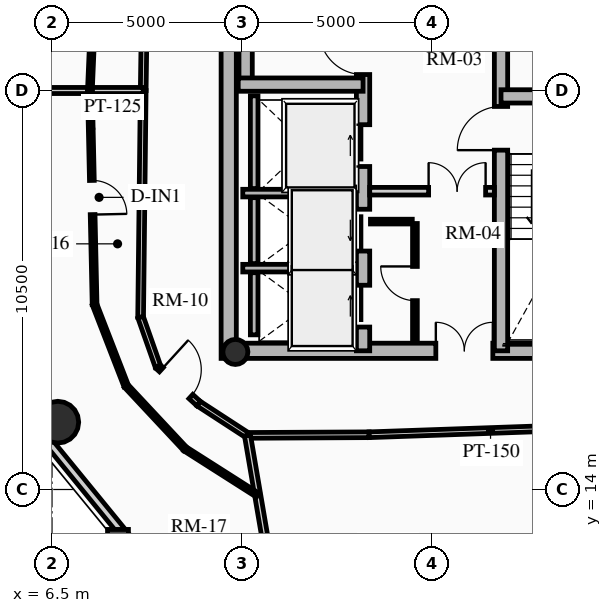
"""IFC4 building model, lengths in metres.
Left out: names, types, materials, properties, quantities, classifications, styles, units other than length and angle.
Written with IfcOpenShell. Run it as: python <this file> out.ifc"""

import sys

from ifc_helpers import new_model, si_unit, direction, frame, frame_2d, origin, origin_2d, place, context, subcontext, project, spatial, rectangle, circle, hollow_circle, extrude, source, transform, mapped, element, fill, save


model = new_model("IFC4")
c1 = context("Model", 3, precision=1e-05, world=origin(), true_north=direction((0.0, 1.0)))
c2 = subcontext(c1, "Body", "Model", "MODEL_VIEW")
j1 = project(units=[si_unit("LENGTHUNIT", "METRE"), si_unit("PLANEANGLEUNIT", "RADIAN")], contexts=[c1])
p1 = place(None, origin())
s1 = spatial("IfcSite", under=j1, at=p1, CompositionType="ELEMENT")
p2 = place(p1, origin())
s2 = spatial("IfcBuilding", under=s1, at=p2, CompositionType="ELEMENT")
p3 = place(p2, frame((0.0, 0.0, 222.85)))
s3 = spatial("IfcBuildingStorey", under=s2, at=p3, CompositionType="ELEMENT", Elevation=222.85)
p4 = place(p3, frame((11.15, 17.45, 0.0), z_axis=(0.0, 0.0, 1.0), x_axis=(0.0, 1.0, 0.0)))
e1 = element("IfcWall", 1, at=p4, inside=s3, PredefinedType="SHEAR", context=c2, shape_type="SweptSolid", body=[
    extrude(rectangle(XDim=14.1, YDim=0.4, at=frame_2d((7.05, 0.0))), origin(), (0.0, 0.0, 1.0), 3.2),
])
p5 = place(p3, frame((11.15, 17.65, 0.0), z_axis=(0.0, 0.0, 1.0), x_axis=(1.0, 0.0, 0.0)))
e2 = element("IfcWall", 2, at=p5, inside=s3, PredefinedType="SHEAR", context=c2, shape_type="SweptSolid", body=[
    extrude(rectangle(XDim=10.7, YDim=0.4, at=frame_2d((5.35, 0.0))), origin(), (0.0, 0.0, 1.0), 3.2),
])
m1 = source(origin(), c2, "Body", "SweptSolid", [
    extrude(rectangle(XDim=1.5, YDim=2.02, at=frame_2d((0.75, 1.01))), frame((0.0, 0.21, 0.0), z_axis=(0.0, -1.0, 0.0), x_axis=(1.0, 0.0, 0.0)), (0.0, 0.0, 1.0), 0.42),
])
p6 = place(p5, frame((5.45, 0.0, 0.0)))
e3 = element("IfcOpeningElement", 3, at=p6, cuts=e2, PredefinedType="OPENING", context=c2, shape_type="MappedRepresentation", body=[
    mapped(m1, transform((0.0, 0.0, 0.0), x_axis=(1.0, 0.0, 0.0), y_axis=(0.0, 1.0, 0.0), z_axis=(0.0, 0.0, 1.0), scale=1.0)),
])
p7 = place(p3, frame((14.685, 17.65, 0.0), z_axis=(0.0, 0.0, 1.0), x_axis=(0.0, 1.0, 0.0)))
e4 = element("IfcWall", 4, at=p7, inside=s3, PredefinedType="SHEAR", context=c2, shape_type="SweptSolid", body=[
    extrude(rectangle(XDim=13.7, YDim=0.35, at=frame_2d((6.85, 0.0))), origin(), (0.0, 0.0, 1.0), 3.2),
])
m2 = source(origin(), c2, "Body", "SweptSolid", [
    extrude(rectangle(XDim=1.1, YDim=2.015, at=frame_2d((0.55, 1.007))), frame((0.0, 0.185, 0.0), z_axis=(0.0, -1.0, 0.0), x_axis=(1.0, 0.0, 0.0)), (0.0, 0.0, 1.0), 0.37),
])
p8 = place(p7, frame((4.85, 0.0, 0.0)))
e5 = element("IfcOpeningElement", 5, at=p8, cuts=e4, PredefinedType="OPENING", context=c2, shape_type="MappedRepresentation", body=[
    mapped(m2, transform((0.0, 0.0, 0.0), x_axis=(1.0, 0.0, 0.0), y_axis=(0.0, 1.0, 0.0), z_axis=(0.0, 0.0, 1.0), scale=1.0)),
])
p9 = place(p7, frame((0.625, 0.0, 0.0)))
e6 = element("IfcOpeningElement", 6, at=p9, cuts=e4, PredefinedType="OPENING", context=c2, shape_type="MappedRepresentation", body=[
    mapped(m2, transform((0.0, 0.0, 0.0), x_axis=(1.0, 0.0, 0.0), y_axis=(0.0, 1.0, 0.0), z_axis=(0.0, 0.0, 1.0), scale=1.0)),
])
p10 = place(p7, frame((2.625, 0.0, 0.0)))
e7 = element("IfcOpeningElement", 7, at=p10, cuts=e4, PredefinedType="OPENING", context=c2, shape_type="MappedRepresentation", body=[
    mapped(m2, transform((0.0, 0.0, 0.0), x_axis=(1.0, 0.0, 0.0), y_axis=(0.0, 1.0, 0.0), z_axis=(0.0, 0.0, 1.0), scale=1.0)),
])
m3 = source(origin(), c2, "Body", "SweptSolid", [
    extrude(rectangle(XDim=1.15, YDim=2.02, at=frame_2d((0.575, 1.01))), frame((0.0, 0.185, 0.0), z_axis=(0.0, -1.0, 0.0), x_axis=(1.0, 0.0, 0.0)), (0.0, 0.0, 1.0), 0.37),
])
p11 = place(p7, frame((7.27, 0.0, 0.0)))
e8 = element("IfcOpeningElement", 8, at=p11, cuts=e4, PredefinedType="OPENING", context=c2, shape_type="MappedRepresentation", body=[
    mapped(m3, transform((0.0, 0.0, 0.0), x_axis=(1.0, 0.0, 0.0), y_axis=(0.0, 1.0, 0.0), z_axis=(0.0, 0.0, 1.0), scale=1.0)),
])
p12 = place(p3, frame((18.315, 17.65, 0.0), z_axis=(0.0, 0.0, 1.0), x_axis=(0.0, 1.0, 0.0)))
e9 = element("IfcWall", 9, at=p12, inside=s3, PredefinedType="SHEAR", context=c2, shape_type="SweptSolid", body=[
    extrude(rectangle(XDim=9.6, YDim=0.35, at=frame_2d((4.8, 0.0))), origin(), (0.0, 0.0, 1.0), 3.2),
])
p13 = place(p12, frame((5.28, 0.0, 0.0)))
e10 = element("IfcOpeningElement", 10, at=p13, cuts=e9, PredefinedType="OPENING", context=c2, shape_type="MappedRepresentation", body=[
    mapped(m3, transform((0.0, 0.0, 0.0), x_axis=(1.0, 0.0, 0.0), y_axis=(0.0, 1.0, 0.0), z_axis=(0.0, 0.0, 1.0), scale=1.0)),
])
p14 = place(p3, frame((11.595, 24.655, 0.0), z_axis=(0.0, 0.0, 1.0), x_axis=(0.0, 1.0, 0.0)))
e11 = element("IfcWall", 11, at=p14, inside=s3, PredefinedType="SHEAR", context=c2, shape_type="SweptSolid", body=[
    extrude(rectangle(XDim=6.695, YDim=0.35, at=frame_2d((3.348, 0.0))), origin(), (0.0, 0.0, 1.0), 3.2),
])
for number, where, z_axis, x_axis in (
    (12, (11.4, 24.655, 0.0), (0.0, 0.0, 1.0), (1.0, 0.0, 0.0)),
    (13, (18.315, 24.345, 0.0), (0.0, 0.0, 1.0), (1.0, 0.0, 0.0)),
):
    element("IfcWall", number, at=place(p3, frame(where, z_axis=z_axis, x_axis=x_axis)), inside=s3, PredefinedType="SHEAR", context=c2, shape_type="SweptSolid", body=[
        extrude(rectangle(XDim=3.285, YDim=0.35, at=frame_2d((1.643, 0.0))), origin(), (0.0, 0.0, 1.0), 3.2),
    ])
p15 = place(p3, frame((11.325, 17.62, 0.0), z_axis=(0.0, 0.0, 1.0), x_axis=(1.0, 0.0, 0.0)))
e14 = element("IfcColumn", 14, at=p15, inside=s3, PredefinedType="COLUMN", context=c2, shape_type="SweptSolid", body=[
    extrude(hollow_circle(Radius=0.33, WallThickness=0.025, at=origin_2d()), origin(), (0.0, 0.0, 1.0), 3.2),
])
p16 = place(p3, frame((6.653, 15.771, 0.0), z_axis=(0.0, 0.0, 1.0), x_axis=(1.0, 0.0, 0.0)))
e15 = element("IfcColumn", 15, at=p16, inside=s3, PredefinedType="USERDEFINED", context=c2, shape_type="SweptSolid", body=[
    extrude(circle(Radius=0.55, at=origin_2d()), origin(), (0.0, 0.0, 1.0), 3.2),
])
p17 = place(p3, frame((9.076, 11.985, 0.0), z_axis=(0.0, 0.0, 1.0), x_axis=(-0.632467166636, 0.774587169483, 0.0)))
e16 = element("IfcWall", 16, at=p17, inside=s3, PredefinedType="SOLIDWALL", context=c2, shape_type="SweptSolid", body=[
    extrude(rectangle(XDim=4.418, YDim=0.22, at=frame_2d((2.209, 0.0))), origin(), (0.0, 0.0, 1.0), 2.612),
])
p18 = place(p3, frame((11.52, 21.8, 0.0), z_axis=(0.0, 0.0, 1.0), x_axis=(1.0, 0.0, 0.0)))
e17 = element("IfcWall", 17, at=p18, inside=s3, PredefinedType="SHEAR", context=c2, shape_type="SweptSolid", body=[
    extrude(rectangle(XDim=2.97, YDim=0.2, at=frame_2d((1.485, 0.0))), origin(), (0.0, 0.0, 1.0), 3.2),
])
p19 = place(p3, frame((11.82, 21.92, 0.0), z_axis=(0.0, 0.0, 1.0), x_axis=(0.0, 1.0, 0.0)))
e18 = element("IfcWall", 18, at=p19, inside=s3, PredefinedType="SHEAR", context=c2, shape_type="SweptSolid", body=[
    extrude(rectangle(XDim=2.44, YDim=0.2, at=frame_2d((1.22, 0.0))), origin(), (0.0, 0.0, 1.0), 3.2),
])
p20 = place(p3, frame((11.52, 19.825, 0.0), z_axis=(0.0, 0.0, 1.0), x_axis=(1.0, 0.0, 0.0)))
e19 = element("IfcWall", 19, at=p20, inside=s3, PredefinedType="SHEAR", context=c2, shape_type="SweptSolid", body=[
    extrude(rectangle(XDim=2.97, YDim=0.2, at=frame_2d((1.485, 0.0))), origin(), (0.0, 0.0, 1.0), 3.2),
])
p21 = place(p3, frame((11.82, 19.945, 0.0), z_axis=(0.0, 0.0, 1.0), x_axis=(0.0, 1.0, 0.0)))
e20 = element("IfcWall", 20, at=p21, inside=s3, PredefinedType="SHEAR", context=c2, shape_type="SweptSolid", body=[
    extrude(rectangle(XDim=1.735, YDim=0.2, at=frame_2d((0.867, 0.0))), origin(), (0.0, 0.0, 1.0), 3.2),
])
p22 = place(p3, frame((11.82, 18.07, 0.0), z_axis=(0.0, 0.0, 1.0), x_axis=(0.0, 1.0, 0.0)))
e21 = element("IfcWall", 21, at=p22, inside=s3, PredefinedType="SHEAR", context=c2, shape_type="SweptSolid", body=[
    extrude(rectangle(XDim=1.635, YDim=0.2, at=frame_2d((0.817, 0.0))), origin(), (0.0, 0.0, 1.0), 3.2),
])
p23 = place(p3, frame((14.86, 21.85, 0.0), z_axis=(0.0, 0.0, 1.0), x_axis=(1.0, 0.0, 0.0)))
e22 = element("IfcWall", 22, at=p23, inside=s3, PredefinedType="PARTITIONING", context=c2, shape_type="SweptSolid", body=[
    extrude(rectangle(XDim=3.28, YDim=0.2, at=frame_2d((1.64, 0.0))), origin(), (0.0, 0.0, 1.0), 2.975),
])
m4 = source(origin(), c2, "Body", "SweptSolid", [
    extrude(rectangle(XDim=1.5, YDim=2.02, at=frame_2d((0.75, 1.01))), frame((0.0, 0.11, 0.0), z_axis=(0.0, -1.0, 0.0), x_axis=(1.0, 0.0, 0.0)), (0.0, 0.0, 1.0), 0.22),
])
p24 = place(p23, frame((1.55, 0.0, 0.0)))
e23 = element("IfcOpeningElement", 23, at=p24, cuts=e22, PredefinedType="OPENING", context=c2, shape_type="MappedRepresentation", body=[
    mapped(m4, transform((0.0, 0.0, 0.0), x_axis=(1.0, 0.0, 0.0), y_axis=(0.0, 1.0, 0.0), z_axis=(0.0, 0.0, 1.0), scale=1.0)),
])
p25 = place(p3, frame((16.05, 17.92, 0.0), z_axis=(0.0, 0.0, 1.0), x_axis=(0.0, 1.0, 0.0)))
e24 = element("IfcWall", 24, at=p25, inside=s3, PredefinedType="PARTITIONING", context=c2, shape_type="SweptSolid", body=[
    extrude(rectangle(XDim=3.08, YDim=0.125, at=frame_2d((1.54, 0.0))), origin(), (0.0, 0.0, 1.0), 2.975),
])
m5 = source(origin(), c2, "Body", "SweptSolid", [
    extrude(rectangle(XDim=0.9, YDim=2.005, at=frame_2d((0.45, 1.002))), frame((0.0, 0.073, 0.0), z_axis=(0.0, -1.0, 0.0), x_axis=(1.0, 0.0, 0.0)), (0.0, 0.0, 1.0), 0.145),
])
p26 = place(p25, frame((1.05, 0.0, 0.0)))
e25 = element("IfcOpeningElement", 25, at=p26, cuts=e24, PredefinedType="OPENING", context=c2, shape_type="MappedRepresentation", body=[
    mapped(m5, transform((0.0, 0.0, 0.0), x_axis=(1.0, 0.0, 0.0), y_axis=(0.0, 1.0, 0.0), z_axis=(0.0, 0.0, 1.0), scale=1.0)),
])
p27 = place(p3, frame((14.88, 21.05, 0.0), z_axis=(0.0, 0.0, 1.0), x_axis=(1.0, 0.0, 0.0)))
e26 = element("IfcWall", 26, at=p27, inside=s3, PredefinedType="PARTITIONING", context=c2, shape_type="SweptSolid", body=[
    extrude(rectangle(XDim=1.1, YDim=0.125, at=frame_2d((0.55, 0.0))), origin(), (0.0, 0.0, 1.0), 2.975),
])
p28 = place(p3, frame((8.986, 30.349, 0.0), z_axis=(0.0, 0.0, 1.0), x_axis=(-0.014775478218, -0.999890836663, 0.0)))
e27 = element("IfcWall", 27, at=p28, inside=s3, PredefinedType="PARTITIONING", context=c2, shape_type="SweptSolid", body=[
    extrude(rectangle(XDim=5.849, YDim=0.15, at=frame_2d((2.925, 0.0))), origin(), (0.0, 0.0, 1.0), 2.975),
])
p29 = place(p3, frame((8.9, 24.5, 0.0), z_axis=(0.0, 0.0, 1.0), x_axis=(-0.011416369353, -0.999934831132, 0.0)))
e28 = element("IfcWall", 28, at=p29, inside=s3, PredefinedType="PARTITIONING", context=c2, shape_type="SweptSolid", body=[
    extrude(rectangle(XDim=5.967, YDim=0.15, at=frame_2d((2.983, 0.0))), origin(), (0.0, 0.0, 1.0), 2.612),
])
p30 = place(p3, frame((8.832, 18.534, 0.0), z_axis=(0.0, 0.0, 1.0), x_axis=(0.332031819657, -0.943268186008, 0.0)))
e29 = element("IfcWall", 29, at=p30, inside=s3, PredefinedType="PARTITIONING", context=c2, shape_type="SweptSolid", body=[
    extrude(rectangle(XDim=1.377, YDim=0.15, at=frame_2d((0.688, 0.0))), origin(), (0.0, 0.0, 1.0), 2.545),
])
p31 = place(p3, frame((9.289, 17.235, 0.0), z_axis=(0.0, 0.0, 1.0), x_axis=(0.739015164946, -0.673688790155, 0.0)))
e30 = element("IfcWall", 30, at=p31, inside=s3, PredefinedType="PARTITIONING", context=c2, shape_type="SweptSolid", body=[
    extrude(rectangle(XDim=1.446, YDim=0.15, at=frame_2d((0.723, 0.0))), origin(), (0.0, 0.0, 1.0), 2.612),
])
m6 = source(origin(), c2, "Body", "SweptSolid", [
    extrude(rectangle(XDim=1.05, YDim=2.015, at=frame_2d((0.525, 1.007))), frame((0.0, 0.085, 0.0), z_axis=(0.0, -1.0, 0.0), x_axis=(1.0, 0.0, 0.0)), (0.0, 0.0, 1.0), 0.17),
])
p32 = place(p31, frame((0.12, 0.0, 0.0)))
e31 = element("IfcOpeningElement", 31, at=p32, cuts=e30, PredefinedType="OPENING", context=c2, shape_type="MappedRepresentation", body=[
    mapped(m6, transform((0.0, 0.0, 0.0), x_axis=(1.0, 0.0, 0.0), y_axis=(0.0, 1.0, 0.0), z_axis=(0.0, 0.0, 1.0), scale=1.0)),
])
p33 = place(p3, frame((10.358, 16.26, 0.0), z_axis=(0.0, 0.0, 1.0), x_axis=(0.838265397059, -0.545262435983, 0.0)))
e32 = element("IfcWall", 32, at=p33, inside=s3, PredefinedType="PARTITIONING", context=c2, shape_type="SweptSolid", body=[
    extrude(rectangle(XDim=1.534, YDim=0.15, at=frame_2d((0.767, 0.0))), origin(), (0.0, 0.0, 1.0), 2.545),
])
p34 = place(p3, frame((11.644, 15.424, 0.0), z_axis=(0.0, 0.0, 1.0), x_axis=(0.999986552511, 0.005186019339, 0.0)))
e33 = element("IfcWall", 33, at=p34, inside=s3, PredefinedType="PARTITIONING", context=c2, shape_type="SweptSolid", body=[
    extrude(rectangle(XDim=3.201, YDim=0.15, at=frame_2d((1.601, 0.0))), origin(), (0.0, 0.0, 1.0), 2.612),
])
p35 = place(p3, frame((14.845, 15.441, 0.0), z_axis=(0.0, 0.0, 1.0), x_axis=(0.99938794868, 0.034981824334, 0.0)))
e34 = element("IfcWall", 34, at=p35, inside=s3, PredefinedType="PARTITIONING", context=c2, shape_type="SweptSolid", body=[
    extrude(rectangle(XDim=6.393, YDim=0.15, at=frame_2d((3.196, 0.0))), origin(), (0.0, 0.0, 1.0), 2.545),
])
p36 = place(p3, frame((8.9, 24.5, 0.0), z_axis=(0.0, 0.0, 1.0), x_axis=(-1.0, 0.0, 0.0)))
e35 = element("IfcWall", 35, at=p36, inside=s3, PredefinedType="PARTITIONING", context=c2, shape_type="SweptSolid", body=[
    extrude(rectangle(XDim=5.01, YDim=0.16, at=frame_2d((2.505, 0.0))), origin(), (0.0, 0.0, 1.0), 2.612),
])
p37 = place(p3, frame((11.644, 15.424, 0.0), z_axis=(0.0, 0.0, 1.0), x_axis=(0.168350269159, -0.985727237563, 0.0)))
e36 = element("IfcWall", 36, at=p37, inside=s3, PredefinedType="PARTITIONING", context=c2, shape_type="SweptSolid", body=[
    extrude(rectangle(XDim=5.699, YDim=0.16, at=frame_2d((2.85, 0.0))), origin(), (0.0, 0.0, 1.0), 2.612),
])
p38 = place(p3, frame((7.732, 30.048, 0.0), z_axis=(0.0, 0.0, 1.0), x_axis=(-0.042296211955, -0.999105114817, 0.0)))
e37 = element("IfcWall", 37, at=p38, inside=s3, PredefinedType="PARTITIONING", context=c2, shape_type="SweptSolid", body=[
    extrude(rectangle(XDim=5.553, YDim=0.125, at=frame_2d((2.776, 0.0))), origin(), (0.0, 0.0, 1.0), 2.975),
])
p39 = place(p38, frame((2.326, 0.0, 0.0)))
e38 = element("IfcOpeningElement", 38, at=p39, cuts=e37, PredefinedType="OPENING", context=c2, shape_type="MappedRepresentation", body=[
    mapped(m5, transform((0.0, 0.0, 0.0), x_axis=(1.0, 0.0, 0.0), y_axis=(0.0, 1.0, 0.0), z_axis=(0.0, 0.0, 1.0), scale=1.0)),
])
p40 = place(p3, frame((7.497, 24.5, 0.0), z_axis=(0.0, 0.0, 1.0), x_axis=(0.021927972859, -0.999759553096, 0.0)))
e39 = element("IfcWall", 39, at=p40, inside=s3, PredefinedType="PARTITIONING", context=c2, shape_type="SweptSolid", body=[
    extrude(rectangle(XDim=5.634, YDim=0.125, at=frame_2d((2.817, 0.0))), origin(), (0.0, 0.0, 1.0), 2.612),
])
p41 = place(p40, frame((2.367, 0.0, 0.0)))
e40 = element("IfcOpeningElement", 40, at=p41, cuts=e39, PredefinedType="OPENING", context=c2, shape_type="MappedRepresentation", body=[
    mapped(m5, transform((0.0, 0.0, 0.0), x_axis=(1.0, 0.0, 0.0), y_axis=(0.0, 1.0, 0.0), z_axis=(0.0, 0.0, 1.0), scale=1.0)),
])
p42 = place(p3, frame((7.621, 18.868, 0.0), z_axis=(0.0, 0.0, 1.0), x_axis=(0.361712646649, -0.93228963378, 0.0)))
e41 = element("IfcWall", 41, at=p42, inside=s3, PredefinedType="PARTITIONING", context=c2, shape_type="SweptSolid", body=[
    extrude(rectangle(XDim=2.297, YDim=0.125, at=frame_2d((1.148, 0.0))), origin(), (0.0, 0.0, 1.0), 2.545),
])
p43 = place(p3, frame((8.452, 16.726, 0.0), z_axis=(0.0, 0.0, 1.0), x_axis=(0.68299988274, -0.730418482911, 0.0)))
e42 = element("IfcWall", 42, at=p43, inside=s3, PredefinedType="PARTITIONING", context=c2, shape_type="SweptSolid", body=[
    extrude(rectangle(XDim=2.271, YDim=0.125, at=frame_2d((1.135, 0.0))), origin(), (0.0, 0.0, 1.0), 2.612),
])
p44 = place(p3, frame((10.002, 15.068, 0.0), z_axis=(0.0, 0.0, 1.0), x_axis=(0.843381706724, -0.537314895349, 0.0)))
e43 = element("IfcWall", 43, at=p44, inside=s3, PredefinedType="PARTITIONING", context=c2, shape_type="SweptSolid", body=[
    extrude(rectangle(XDim=2.265, YDim=0.125, at=frame_2d((1.132, 0.0))), origin(), (0.0, 0.0, 1.0), 2.545),
])
m7 = source(origin(), c2, "Body", "SweptSolid", [
    extrude(rectangle(XDim=1.1, YDim=2.015, at=frame_2d((0.55, 1.007))), frame((0.0, 0.025, 0.0), z_axis=(0.0, -1.0, 0.0), x_axis=(1.0, 0.0, 0.0)), (0.0, 0.0, 1.0), 0.05),
])
p45 = place(p8, origin())
e44 = element("IfcDoor", 44, at=p45, inside=s3, OperationType="SLIDING_TO_RIGHT", PredefinedType="DOOR", context=c2, shape_type="MappedRepresentation", body=[
    mapped(m7, transform((0.0, 0.0, 0.0), x_axis=(1.0, 0.0, 0.0), y_axis=(0.0, 1.0, 0.0), z_axis=(0.0, 0.0, 1.0), scale=1.0)),
])
fill(e5, e44)
p46 = place(p9, origin())
e45 = element("IfcDoor", 45, at=p46, inside=s3, OperationType="SLIDING_TO_RIGHT", PredefinedType="DOOR", context=c2, shape_type="MappedRepresentation", body=[
    mapped(m7, transform((0.0, 0.0, 0.0), x_axis=(1.0, 0.0, 0.0), y_axis=(0.0, 1.0, 0.0), z_axis=(0.0, 0.0, 1.0), scale=1.0)),
])
fill(e6, e45)
p47 = place(p10, origin())
e46 = element("IfcDoor", 46, at=p47, inside=s3, OperationType="SLIDING_TO_LEFT", PredefinedType="DOOR", context=c2, shape_type="MappedRepresentation", body=[
    mapped(m7, transform((0.0, 0.0, 0.0), x_axis=(1.0, 0.0, 0.0), y_axis=(0.0, 1.0, 0.0), z_axis=(0.0, 0.0, 1.0), scale=1.0)),
])
fill(e7, e46)
m8 = source(origin(), c2, "Body", "SweptSolid", [
    extrude(rectangle(XDim=1.15, YDim=2.02, at=frame_2d((0.575, 1.01))), frame((0.0, 0.025, 0.0), z_axis=(0.0, -1.0, 0.0), x_axis=(1.0, 0.0, 0.0)), (0.0, 0.0, 1.0), 0.05),
])
p48 = place(p11, origin())
e47 = element("IfcDoor", 47, at=p48, inside=s3, OperationType="SINGLE_SWING_RIGHT", PredefinedType="DOOR", context=c2, shape_type="MappedRepresentation", body=[
    mapped(m8, transform((0.0, 0.0, 0.0), x_axis=(1.0, 0.0, 0.0), y_axis=(0.0, 1.0, 0.0), z_axis=(0.0, 0.0, 1.0), scale=1.0)),
])
fill(e8, e47)
p49 = place(p13, origin())
e48 = element("IfcDoor", 48, at=p49, inside=s3, OperationType="SINGLE_SWING_LEFT", PredefinedType="DOOR", context=c2, shape_type="MappedRepresentation", body=[
    mapped(m8, transform((0.0, 0.0, 0.0), x_axis=(1.0, 0.0, 0.0), y_axis=(0.0, 1.0, 0.0), z_axis=(0.0, 0.0, 1.0), scale=1.0)),
])
fill(e10, e48)
m9 = source(origin(), c2, "Body", "SweptSolid", [
    extrude(rectangle(XDim=1.5, YDim=2.02, at=frame_2d((0.75, 1.01))), frame((0.0, 0.025, 0.0), z_axis=(0.0, -1.0, 0.0), x_axis=(1.0, 0.0, 0.0)), (0.0, 0.0, 1.0), 0.05),
])
p50 = place(p6, origin())
e49 = element("IfcDoor", 49, at=p50, inside=s3, OperationType="DOUBLE_DOOR_SINGLE_SWING", PredefinedType="DOOR", context=c2, shape_type="MappedRepresentation", body=[
    mapped(m9, transform((0.0, 0.0, 0.0), x_axis=(1.0, 0.0, 0.0), y_axis=(0.0, 1.0, 0.0), z_axis=(0.0, 0.0, 1.0), scale=1.0)),
])
fill(e3, e49)
p51 = place(p24, origin())
e50 = element("IfcDoor", 50, at=p51, inside=s3, OperationType="DOUBLE_DOOR_SINGLE_SWING", PredefinedType="DOOR", context=c2, shape_type="MappedRepresentation", body=[
    mapped(m9, transform((0.0, 0.0, 0.0), x_axis=(1.0, 0.0, 0.0), y_axis=(0.0, 1.0, 0.0), z_axis=(0.0, 0.0, 1.0), scale=1.0)),
])
fill(e23, e50)
m10 = source(origin(), c2, "Body", "SweptSolid", [
    extrude(rectangle(XDim=0.9, YDim=2.005, at=frame_2d((0.45, 1.002))), frame((0.0, 0.025, 0.0), z_axis=(0.0, -1.0, 0.0), x_axis=(1.0, 0.0, 0.0)), (0.0, 0.0, 1.0), 0.05),
])
p52 = place(p26, origin())
e51 = element("IfcDoor", 51, at=p52, inside=s3, OperationType="SINGLE_SWING_RIGHT", PredefinedType="DOOR", context=c2, shape_type="MappedRepresentation", body=[
    mapped(m10, transform((0.0, 0.0, 0.0), x_axis=(1.0, 0.0, 0.0), y_axis=(0.0, 1.0, 0.0), z_axis=(0.0, 0.0, 1.0), scale=1.0)),
])
fill(e25, e51)
m11 = source(origin(), c2, "Body", "SweptSolid", [
    extrude(rectangle(XDim=1.05, YDim=2.015, at=frame_2d((0.525, 1.007))), frame((0.0, 0.025, 0.0), z_axis=(0.0, -1.0, 0.0), x_axis=(1.0, 0.0, 0.0)), (0.0, 0.0, 1.0), 0.05),
])
p53 = place(p32, origin())
e52 = element("IfcDoor", 52, at=p53, inside=s3, OperationType="SINGLE_SWING_LEFT", PredefinedType="DOOR", context=c2, shape_type="MappedRepresentation", body=[
    mapped(m11, transform((0.0, 0.0, 0.0), x_axis=(1.0, 0.0, 0.0), y_axis=(0.0, 1.0, 0.0), z_axis=(0.0, 0.0, 1.0), scale=1.0)),
])
fill(e31, e52)
p54 = place(p41, origin())
e53 = element("IfcDoor", 53, at=p54, inside=s3, OperationType="SINGLE_SWING_RIGHT", PredefinedType="DOOR", context=c2, shape_type="MappedRepresentation", body=[
    mapped(m10, transform((0.0, 0.0, 0.0), x_axis=(1.0, 0.0, 0.0), y_axis=(0.0, 1.0, 0.0), z_axis=(0.0, 0.0, 1.0), scale=1.0)),
])
fill(e40, e53)
save(model, sys.argv[1])
